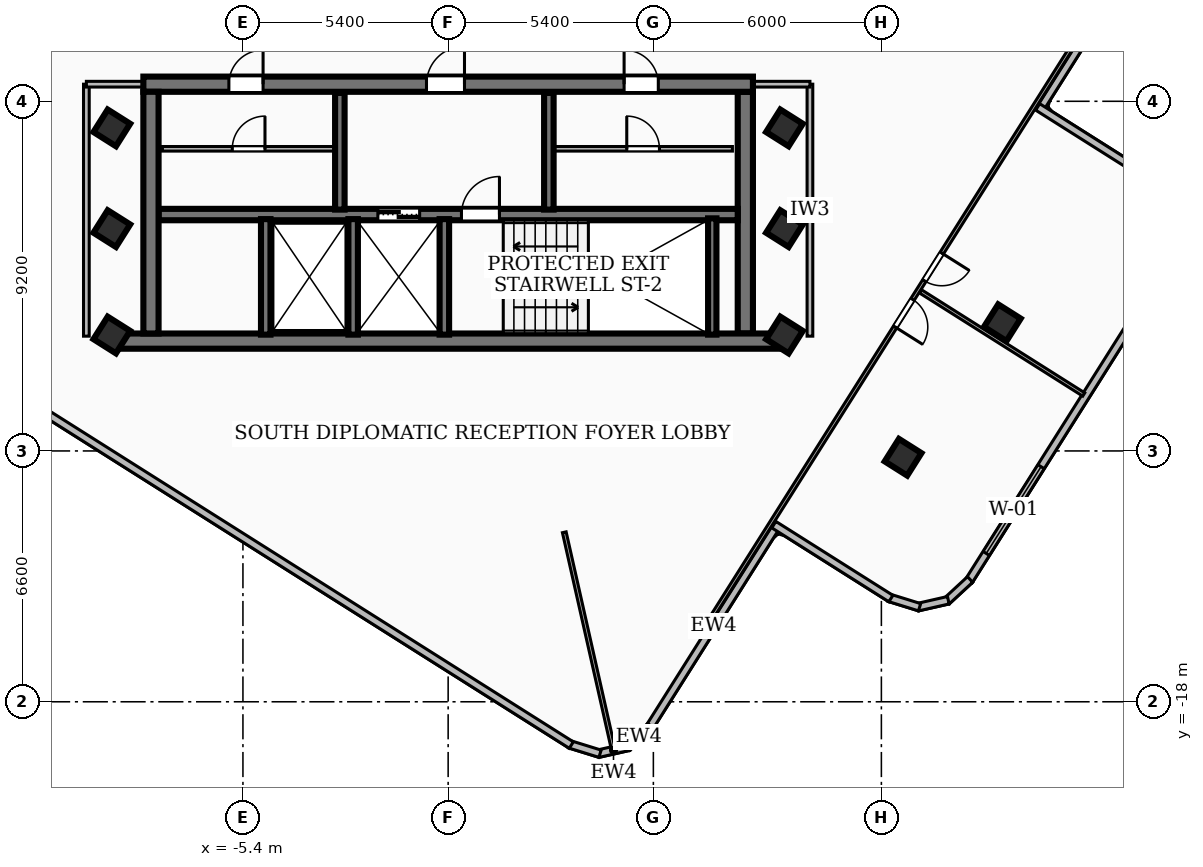
"""IFC4 building model, lengths in metres.
Left out: names, types, materials, properties, quantities, classifications, styles, units other than length and angle.
Written with IfcOpenShell. Run it as: python <this file> out.ifc"""

import sys

from ifc_helpers import new_model, si_unit, direction, frame, frame_2d, origin, origin_2d, place, context, subcontext, project, spatial, rectangle, extrude, element, fill, save


model = new_model("IFC4")
c1 = context("Model", 3, precision=1e-05, world=origin(), true_north=direction((0.0, 1.0)))
c2 = subcontext(c1, "Body", "Model", "MODEL_VIEW")
j1 = project(units=[si_unit("LENGTHUNIT", "METRE"), si_unit("PLANEANGLEUNIT", "RADIAN")], contexts=[c1])
p1 = place(None, origin())
s1 = spatial("IfcSite", under=j1, at=p1, CompositionType="ELEMENT")
p2 = place(p1, origin())
s2 = spatial("IfcBuilding", under=s1, at=p2, CompositionType="ELEMENT")
p3 = place(p2, frame((0.0, 0.0, 274.86)))
s3 = spatial("IfcBuildingStorey", under=s2, at=p3, CompositionType="ELEMENT", Elevation=274.86)
p4 = place(p3, frame((8.78, -8.51, 0.0), z_axis=(0.0, 0.0, 1.0), x_axis=(-1.0, 0.0, 0.0)))
e1 = element("IfcWall", 1, at=p4, inside=s3, PredefinedType="SHEAR", context=c2, shape_type="SweptSolid", body=[
    extrude(rectangle(XDim=17.56, YDim=0.4, at=frame_2d((8.78, 0.0))), origin(), (0.0, 0.0, 1.0), 3.16),
])
p5 = place(p3, frame((-8.02, -1.75, 0.0), z_axis=(0.0, 0.0, 1.0), x_axis=(1.0, 0.0, 0.0)))
e2 = element("IfcWall", 2, at=p5, inside=s3, PredefinedType="SHEAR", context=c2, shape_type="SweptSolid", body=[
    extrude(rectangle(XDim=16.04, YDim=0.4, at=frame_2d((8.02, 0.0))), origin(), (0.0, 0.0, 1.0), 3.16),
])
p6 = place(p5, frame((7.45, 0.0, 0.0)))
e3 = element("IfcOpeningElement", 3, at=p6, cuts=e2, PredefinedType="OPENING", context=c2, shape_type="SweptSolid", body=[
    extrude(rectangle(XDim=1.0, YDim=2.1, at=frame_2d((0.5, 1.05))), frame((0.0, 0.21, 0.0), z_axis=(0.0, -1.0, 0.0), x_axis=(1.0, 0.0, 0.0)), (0.0, 0.0, 1.0), 0.42),
])
p7 = place(p5, frame((12.65, 0.0, 0.0)))
e4 = element("IfcOpeningElement", 4, at=p7, cuts=e2, PredefinedType="OPENING", context=c2, shape_type="SweptSolid", body=[
    extrude(rectangle(XDim=0.9, YDim=2.06, at=frame_2d((0.45, 1.03))), frame((0.0, 0.21, 0.0), z_axis=(0.0, -1.0, 0.0), x_axis=(1.0, 0.0, 0.0)), (0.0, 0.0, 1.0), 0.42),
])
p8 = place(p5, frame((2.25, 0.0, 0.0)))
e5 = element("IfcOpeningElement", 5, at=p8, cuts=e2, PredefinedType="OPENING", context=c2, shape_type="SweptSolid", body=[
    extrude(rectangle(XDim=0.9, YDim=2.06, at=frame_2d((0.45, 1.03))), frame((0.0, 0.21, 0.0), z_axis=(0.0, -1.0, 0.0), x_axis=(1.0, 0.0, 0.0)), (0.0, 0.0, 1.0), 0.42),
])
for number, where, z_axis, x_axis in (
    (6, (-7.82, -8.31, 0.0), (0.0, 0.0, 1.0), (0.0, 1.0, 0.0)),
    (7, (7.82, -1.95, 0.0), (0.0, 0.0, 1.0), (0.0, -1.0, 0.0)),
):
    element("IfcWall", number, at=place(p3, frame(where, z_axis=z_axis, x_axis=x_axis)), inside=s3, PredefinedType="SHEAR", context=c2, shape_type="SweptSolid", body=[
        extrude(rectangle(XDim=6.36, YDim=0.4, at=frame_2d((3.18, 0.0))), origin(), (0.0, 0.0, 1.0), 3.16),
    ])
p9 = place(p3, frame((-7.62, -5.18, 0.0), z_axis=(0.0, 0.0, 1.0), x_axis=(1.0, 0.0, 0.0)))
e8 = element("IfcWall", 8, at=p9, inside=s3, PredefinedType="SOLIDWALL", context=c2, shape_type="SweptSolid", body=[
    extrude(rectangle(XDim=15.24, YDim=0.3, at=frame_2d((7.62, 0.0))), origin(), (0.0, 0.0, 1.0), 3.16),
])
p10 = place(p9, frame((5.77, 0.0, 0.0)))
e9 = element("IfcOpeningElement", 9, at=p10, cuts=e8, PredefinedType="OPENING", context=c2, shape_type="SweptSolid", body=[
    extrude(rectangle(XDim=1.1, YDim=2.15, at=frame_2d((0.55, 1.075))), frame((0.0, 0.16, 0.0), z_axis=(0.0, -1.0, 0.0), x_axis=(1.0, 0.0, 0.0)), (0.0, 0.0, 1.0), 0.32),
])
p11 = place(p9, frame((7.97, 0.0, 0.0)))
e10 = element("IfcOpeningElement", 10, at=p11, cuts=e8, PredefinedType="OPENING", context=c2, shape_type="SweptSolid", body=[
    extrude(rectangle(XDim=1.0, YDim=2.1, at=frame_2d((0.5, 1.05))), frame((0.0, 0.16, 0.0), z_axis=(0.0, -1.0, 0.0), x_axis=(1.0, 0.0, 0.0)), (0.0, 0.0, 1.0), 0.32),
])
p12 = place(p3, frame((6.95, -8.34, 0.0), z_axis=(0.0, 0.0, 1.0), x_axis=(0.0, 1.0, 0.0)))
e11 = element("IfcWall", 11, at=p12, inside=s3, PredefinedType="SOLIDWALL", context=c2, shape_type="SweptSolid", body=[
    extrude(rectangle(XDim=3.06, YDim=0.22, at=frame_2d((1.53, 0.0))), origin(), (0.0, 0.0, 1.0), 3.16),
])
for number, where, z_axis, x_axis in (
    (12, (-0.1, -8.34, 0.0), (0.0, 0.0, 1.0), (0.0, 1.0, 0.0)),
    (13, (-2.5, -8.34, 0.0), (0.0, 0.0, 1.0), (0.0, 1.0, 0.0)),
    (14, (-4.8, -8.34, 0.0), (0.0, 0.0, 1.0), (0.0, 1.0, 0.0)),
):
    element("IfcWall", number, at=place(p3, frame(where, z_axis=z_axis, x_axis=x_axis)), inside=s3, PredefinedType="SOLIDWALL", context=c2, shape_type="SweptSolid", body=[
        extrude(rectangle(XDim=3.04, YDim=0.25, at=frame_2d((1.52, 0.0))), origin(), (0.0, 0.0, 1.0), 3.16),
    ])
for number, where, z_axis, x_axis in (
    (15, (-2.85, -5.05, 0.0), (0.0, 0.0, 1.0), (0.0, 1.0, 0.0)),
    (16, (2.65, -5.05, 0.0), (0.0, 0.0, 1.0), (0.0, 1.0, 0.0)),
):
    element("IfcWall", number, at=place(p3, frame(where, z_axis=z_axis, x_axis=x_axis)), inside=s3, PredefinedType="SOLIDWALL", context=c2, shape_type="SweptSolid", body=[
        extrude(rectangle(XDim=3.07, YDim=0.25, at=frame_2d((1.535, 0.0))), origin(), (0.0, 0.0, 1.0), 3.16),
    ])
for number, where, z_axis, x_axis in (
    (17, (-8.85, -5.55, 0.0), (0.0, 0.0, 1.0), (0.534, 0.845, 0.0)),
    (18, (-8.85, -2.9, 0.0), (0.0, 0.0, 1.0), (0.534, 0.845, 0.0)),
    (19, (8.85, -5.55, 0.0), (0.0, 0.0, 1.0), (0.534, 0.845, 0.0)),
    (20, (8.85, -2.9, 0.0), (0.0, 0.0, 1.0), (0.534, 0.845, 0.0)),
    (21, (8.85, -8.35, 0.0), (0.0, 0.0, 1.0), (0.534, 0.845, 0.0)),
    (22, (-8.85, -8.35, 0.0), (0.0, 0.0, 1.0), (0.534, 0.845, 0.0)),
    (23, (11.971, -11.566, 0.0), (0.0, 0.0, 1.0), (0.534, 0.845, 0.0)),
    (24, (14.583, -8.026, 0.0), (0.0, 0.0, 1.0), (0.534, 0.845, 0.0)),
):
    element("IfcColumn", number, at=place(p3, frame(where, z_axis=z_axis, x_axis=x_axis)), inside=s3, PredefinedType="COLUMN", context=c2, shape_type="SweptSolid", body=[
        extrude(rectangle(XDim=0.7, YDim=0.7, at=origin_2d()), origin(), (0.0, 0.0, 1.0), 3.42),
    ])
p13 = place(p3, frame((8.681, -13.314, 0.0), z_axis=(0.0, 0.0, 1.0), x_axis=(-0.533927810135, -0.845530066623, 0.0)))
e25 = element("IfcWall", 25, at=p13, inside=s3, PredefinedType="SOLIDWALL", context=c2, shape_type="SweptSolid", body=[
    extrude(rectangle(XDim=6.342, YDim=0.2, at=frame_2d((3.171, 0.0))), origin(), (0.0, 0.0, 1.0), 3.16),
])
p14 = place(p3, frame((5.326, -18.638, 0.0), z_axis=(0.0, 0.0, 1.0), x_axis=(-0.734546260064, -0.678558613405, 0.0)))
e26 = element("IfcWall", 26, at=p14, inside=s3, PredefinedType="SOLIDWALL", context=c2, shape_type="SweptSolid", body=[
    extrude(rectangle(XDim=0.837, YDim=0.2, at=frame_2d((0.418, 0.0))), origin(), (0.0, 0.0, 1.0), 3.16),
])
p15 = place(p3, frame((4.753, -19.183, 0.0), z_axis=(0.0, 0.0, 1.0), x_axis=(-0.975095027757, -0.22178748126, 0.0)))
e27 = element("IfcWall", 27, at=p15, inside=s3, PredefinedType="SOLIDWALL", context=c2, shape_type="SweptSolid", body=[
    extrude(rectangle(XDim=0.824, YDim=0.2, at=frame_2d((0.412, 0.0))), origin(), (0.0, 0.0, 1.0), 3.16),
])
p16 = place(p3, frame((3.997, -19.367, 0.0), z_axis=(0.0, 0.0, 1.0), x_axis=(-0.955248680357, 0.295803919306, 0.0)))
e28 = element("IfcWall", 28, at=p16, inside=s3, PredefinedType="SOLIDWALL", context=c2, shape_type="SweptSolid", body=[
    extrude(rectangle(XDim=0.839, YDim=0.2, at=frame_2d((0.419, 0.0))), origin(), (0.0, 0.0, 1.0), 3.16),
])
p17 = place(p3, frame((3.241, -19.139, 0.0), z_axis=(0.0, 0.0, 1.0), x_axis=(-0.84545958519, 0.534039408481, 0.0)))
e29 = element("IfcWall", 29, at=p17, inside=s3, PredefinedType="SOLIDWALL", context=c2, shape_type="SweptSolid", body=[
    extrude(rectangle(XDim=25.923, YDim=0.2, at=frame_2d((12.961, 0.0))), origin(), (0.0, 0.0, 1.0), 3.16),
])
p18 = place(p17, frame((19.02, 0.0, 0.85)))
e30 = element("IfcOpeningElement", 30, at=p18, cuts=e29, PredefinedType="OPENING", context=c2, shape_type="SweptSolid", body=[
    extrude(rectangle(XDim=2.4, YDim=1.65, at=frame_2d((1.2, 0.825))), frame((0.0, 0.11, 0.0), z_axis=(0.0, -1.0, 0.0), x_axis=(1.0, 0.0, 0.0)), (0.0, 0.0, 1.0), 0.22),
])
p19 = place(p3, frame((19.139, 3.241, 0.0), z_axis=(0.0, 0.0, 1.0), x_axis=(-0.534084270085, -0.845431246435, 0.0)))
e31 = element("IfcWall", 31, at=p19, inside=s3, PredefinedType="SOLIDWALL", context=c2, shape_type="SweptSolid", body=[
    extrude(rectangle(XDim=6.742, YDim=0.2, at=frame_2d((3.371, 0.0))), origin(), (0.0, 0.0, 1.0), 3.16),
])
p20 = place(p3, frame((15.513, -2.348, 0.0), z_axis=(0.0, 0.0, 1.0), x_axis=(0.8454427056, -0.534066130313, 0.0)))
e32 = element("IfcWall", 32, at=p20, inside=s3, PredefinedType="SOLIDWALL", context=c2, shape_type="SweptSolid", body=[
    extrude(rectangle(XDim=3.642, YDim=0.2, at=frame_2d((1.821, 0.0))), origin(), (0.0, 0.0, 1.0), 3.16),
])
p21 = place(p3, frame((19.056, -6.346, 0.0), z_axis=(0.0, 0.0, 1.0), x_axis=(-0.534060804588, -0.845446069837, 0.0)))
e33 = element("IfcWall", 33, at=p21, inside=s3, PredefinedType="SOLIDWALL", context=c2, shape_type="SweptSolid", body=[
    extrude(rectangle(XDim=10.023, YDim=0.2, at=frame_2d((5.012, 0.0))), origin(), (0.0, 0.0, 1.0), 3.16),
])
p22 = place(p21, frame((6.468, 0.0, 0.85)))
e34 = element("IfcOpeningElement", 34, at=p22, cuts=e33, PredefinedType="OPENING", context=c2, shape_type="SweptSolid", body=[
    extrude(rectangle(XDim=2.7, YDim=2.1, at=frame_2d((1.35, 1.05))), frame((0.0, 0.11, 0.0), z_axis=(0.0, -1.0, 0.0), x_axis=(1.0, 0.0, 0.0)), (0.0, 0.0, 1.0), 0.22),
])
p23 = place(p3, frame((13.734, -14.782, 0.0), z_axis=(0.0, 0.0, 1.0), x_axis=(-0.73396507435, -0.679187212508, 0.0)))
e35 = element("IfcWall", 35, at=p23, inside=s3, PredefinedType="SOLIDWALL", context=c2, shape_type="SweptSolid", body=[
    extrude(rectangle(XDim=0.838, YDim=0.2, at=frame_2d((0.419, 0.0))), origin(), (0.0, 0.0, 1.0), 3.16),
])
p24 = place(p3, frame((13.161, -15.328, 0.0), z_axis=(0.0, 0.0, 1.0), x_axis=(-0.975030953114, -0.222068999343, 0.0)))
e36 = element("IfcWall", 36, at=p24, inside=s3, PredefinedType="SOLIDWALL", context=c2, shape_type="SweptSolid", body=[
    extrude(rectangle(XDim=0.824, YDim=0.2, at=frame_2d((0.412, 0.0))), origin(), (0.0, 0.0, 1.0), 3.16),
])
p25 = place(p3, frame((12.405, -15.512, 0.0), z_axis=(0.0, 0.0, 1.0), x_axis=(-0.95514660916, 0.296133339917, 0.0)))
e37 = element("IfcWall", 37, at=p25, inside=s3, PredefinedType="SOLIDWALL", context=c2, shape_type="SweptSolid", body=[
    extrude(rectangle(XDim=0.838, YDim=0.2, at=frame_2d((0.419, 0.0))), origin(), (0.0, 0.0, 1.0), 3.16),
])
p26 = place(p3, frame((11.65, -15.284, 0.0), z_axis=(0.0, 0.0, 1.0), x_axis=(-0.84553031048, 0.533927423962, 0.0)))
e38 = element("IfcWall", 38, at=p26, inside=s3, PredefinedType="SOLIDWALL", context=c2, shape_type="SweptSolid", body=[
    extrude(rectangle(XDim=3.643, YDim=0.2, at=frame_2d((1.821, 0.0))), origin(), (0.0, 0.0, 1.0), 3.16),
])
p27 = place(p3, frame((2.8, -3.45, 0.0), z_axis=(0.0, 0.0, 1.0), x_axis=(1.0, 0.0, 0.0)))
e39 = element("IfcWall", 39, at=p27, inside=s3, PredefinedType="PARTITIONING", context=c2, shape_type="SweptSolid", body=[
    extrude(rectangle(XDim=4.68, YDim=0.12, at=frame_2d((2.34, 0.0))), origin(), (0.0, 0.0, 1.0), 3.16),
])
p28 = place(p27, frame((1.9, 0.0, 0.0)))
e40 = element("IfcOpeningElement", 40, at=p28, cuts=e39, PredefinedType="OPENING", context=c2, shape_type="SweptSolid", body=[
    extrude(rectangle(XDim=0.86, YDim=2.04, at=frame_2d((0.43, 1.02))), frame((0.0, 0.07, 0.0), z_axis=(0.0, -1.0, 0.0), x_axis=(1.0, 0.0, 0.0)), (0.0, 0.0, 1.0), 0.14),
])
p29 = place(p3, frame((-7.52, -3.45, 0.0), z_axis=(0.0, 0.0, 1.0), x_axis=(1.0, 0.0, 0.0)))
e41 = element("IfcWall", 41, at=p29, inside=s3, PredefinedType="PARTITIONING", context=c2, shape_type="SweptSolid", body=[
    extrude(rectangle(XDim=4.54, YDim=0.12, at=frame_2d((2.27, 0.0))), origin(), (0.0, 0.0, 1.0), 3.16),
])
p30 = place(p29, frame((1.84, 0.0, 0.0)))
e42 = element("IfcOpeningElement", 42, at=p30, cuts=e41, PredefinedType="OPENING", context=c2, shape_type="SweptSolid", body=[
    extrude(rectangle(XDim=0.86, YDim=2.04, at=frame_2d((0.43, 1.02))), frame((0.0, 0.07, 0.0), z_axis=(0.0, -1.0, 0.0), x_axis=(1.0, 0.0, 0.0)), (0.0, 0.0, 1.0), 0.14),
])
p31 = place(p3, frame((-9.52, -8.38, 0.0), z_axis=(0.0, 0.0, 1.0), x_axis=(0.0, 1.0, 0.0)))
e43 = element("IfcWall", 43, at=p31, inside=s3, PredefinedType="PARTITIONING", context=c2, shape_type="SweptSolid", body=[
    extrude(rectangle(XDim=6.63, YDim=0.15, at=frame_2d((3.315, 0.0))), origin(), (0.0, 0.0, 1.0), 3.16),
])
p32 = place(p3, frame((-7.85, -1.75, 0.0), z_axis=(0.0, 0.0, 1.0), x_axis=(-1.0, 0.0, 0.0)))
e44 = element("IfcWall", 44, at=p32, inside=s3, PredefinedType="PARTITIONING", context=c2, shape_type="SweptSolid", body=[
    extrude(rectangle(XDim=1.67, YDim=0.15, at=frame_2d((0.835, 0.0))), origin(), (0.0, 0.0, 1.0), 2.39),
])
p33 = place(p3, frame((9.52, -8.38, 0.0), z_axis=(0.0, 0.0, 1.0), x_axis=(0.0, 1.0, 0.0)))
e45 = element("IfcWall", 45, at=p33, inside=s3, PredefinedType="PARTITIONING", context=c2, shape_type="SweptSolid", body=[
    extrude(rectangle(XDim=6.63, YDim=0.15, at=frame_2d((3.315, 0.0))), origin(), (0.0, 0.0, 1.0), 2.53),
])
p34 = place(p3, frame((7.85, -1.75, 0.0), z_axis=(0.0, 0.0, 1.0), x_axis=(1.0, 0.0, 0.0)))
e46 = element("IfcWall", 46, at=p34, inside=s3, PredefinedType="PARTITIONING", context=c2, shape_type="SweptSolid", body=[
    extrude(rectangle(XDim=1.67, YDim=0.15, at=frame_2d((0.835, 0.0))), origin(), (0.0, 0.0, 1.0), 2.39),
])
p35 = place(p3, frame((3.056, -13.54, 0.0), z_axis=(0.0, 0.0, 1.0), x_axis=(0.22033949405, -0.975423245244, 0.0)))
e47 = element("IfcWall", 47, at=p35, inside=s3, PredefinedType="PARTITIONING", context=c2, shape_type="SweptSolid", body=[
    extrude(rectangle(XDim=5.814, YDim=0.1, at=frame_2d((2.907, 0.0))), origin(), (0.0, 0.0, 1.0), 3.16),
])
p36 = place(p3, frame((-17.646, -1.178, 0.0), z_axis=(0.0, 0.0, 1.0), x_axis=(0.534052309352, 0.845451436143, 0.0)))
e48 = element("IfcWall", 48, at=p36, inside=s3, PredefinedType="PARTITIONING", context=c2, shape_type="SweptSolid", body=[
    extrude(rectangle(XDim=20.44, YDim=0.1, at=frame_2d((10.22, 0.0))), origin(), (0.0, 0.0, 1.0), 2.53),
])
p37 = place(p36, frame((11.259, 0.0, 0.0)))
e49 = element("IfcOpeningElement", 49, at=p37, cuts=e48, PredefinedType="OPENING", context=c2, shape_type="SweptSolid", body=[
    extrude(rectangle(XDim=0.86, YDim=2.04, at=frame_2d((0.43, 1.02))), frame((0.0, 0.06, 0.0), z_axis=(0.0, -1.0, 0.0), x_axis=(1.0, 0.0, 0.0)), (0.0, 0.0, 1.0), 0.12),
])
p38 = place(p36, frame((9.819, 0.0, 0.0)))
e50 = element("IfcOpeningElement", 50, at=p38, cuts=e48, PredefinedType="OPENING", context=c2, shape_type="SweptSolid", body=[
    extrude(rectangle(XDim=0.86, YDim=2.04, at=frame_2d((0.43, 1.02))), frame((0.0, 0.06, 0.0), z_axis=(0.0, -1.0, 0.0), x_axis=(1.0, 0.0, 0.0)), (0.0, 0.0, 1.0), 0.12),
])
p39 = place(p3, frame((12.426, -7.199, 0.0), z_axis=(0.0, 0.0, 1.0), x_axis=(0.845412458252, -0.53411400977, 0.0)))
e51 = element("IfcWall", 51, at=p39, inside=s3, PredefinedType="PARTITIONING", context=c2, shape_type="SweptSolid", body=[
    extrude(rectangle(XDim=5.085, YDim=0.1, at=frame_2d((2.542, 0.0))), origin(), (0.0, 0.0, 1.0), 2.53),
])
p40 = place(p3, frame((17.646, 1.178, 0.0), z_axis=(0.0, 0.0, 1.0), x_axis=(-0.534052309352, -0.845451436143, 0.0)))
e52 = element("IfcWall", 52, at=p40, inside=s3, PredefinedType="PARTITIONING", context=c2, shape_type="SweptSolid", body=[
    extrude(rectangle(XDim=20.44, YDim=0.1, at=frame_2d((10.22, 0.0))), origin(), (0.0, 0.0, 1.0), 2.53),
])
p41 = place(p40, frame((10.159, 0.0, 0.0)))
e53 = element("IfcOpeningElement", 53, at=p41, cuts=e52, PredefinedType="OPENING", context=c2, shape_type="SweptSolid", body=[
    extrude(rectangle(XDim=0.86, YDim=2.04, at=frame_2d((0.43, 1.02))), frame((0.0, 0.06, 0.0), z_axis=(0.0, -1.0, 0.0), x_axis=(1.0, 0.0, 0.0)), (0.0, 0.0, 1.0), 0.12),
])
p42 = place(p40, frame((8.719, 0.0, 0.0)))
e54 = element("IfcOpeningElement", 54, at=p42, cuts=e52, PredefinedType="OPENING", context=c2, shape_type="SweptSolid", body=[
    extrude(rectangle(XDim=0.86, YDim=2.04, at=frame_2d((0.43, 1.02))), frame((0.0, 0.06, 0.0), z_axis=(0.0, -1.0, 0.0), x_axis=(1.0, 0.0, 0.0)), (0.0, 0.0, 1.0), 0.12),
])
p43 = place(p22, origin())
e55 = element("IfcWindow", 55, at=p43, inside=s3, PartitioningType="SINGLE_PANEL", PredefinedType="WINDOW", context=c2, shape_type="SweptSolid", body=[
    extrude(rectangle(XDim=2.7, YDim=2.1, at=frame_2d((1.35, 1.05))), frame((0.0, 0.03, 0.0), z_axis=(0.0, -1.0, 0.0), x_axis=(1.0, 0.0, 0.0)), (0.0, 0.0, 1.0), 0.06),
])
fill(e34, e55)
p44 = place(p6, origin())
e56 = element("IfcDoor", 56, at=p44, inside=s3, OperationType="SINGLE_SWING_RIGHT", PredefinedType="DOOR", context=c2, shape_type="SweptSolid", body=[
    extrude(rectangle(XDim=1.0, YDim=2.1, at=frame_2d((0.5, 1.05))), frame((0.0, 0.025, 0.0), z_axis=(0.0, -1.0, 0.0), x_axis=(1.0, 0.0, 0.0)), (0.0, 0.0, 1.0), 0.05),
])
fill(e3, e56)
p45 = place(p10, origin())
e57 = element("IfcDoor", 57, at=p45, inside=s3, OperationType="DOUBLE_DOOR_SLIDING", PredefinedType="DOOR", context=c2, shape_type="SweptSolid", body=[
    extrude(rectangle(XDim=1.1, YDim=2.15, at=frame_2d((0.55, 1.075))), frame((0.0, 0.025, 0.0), z_axis=(0.0, -1.0, 0.0), x_axis=(1.0, 0.0, 0.0)), (0.0, 0.0, 1.0), 0.05),
])
fill(e9, e57)
p46 = place(p11, origin())
e58 = element("IfcDoor", 58, at=p46, inside=s3, OperationType="SINGLE_SWING_RIGHT", PredefinedType="DOOR", context=c2, shape_type="SweptSolid", body=[
    extrude(rectangle(XDim=1.0, YDim=2.1, at=frame_2d((0.5, 1.05))), frame((0.0, 0.025, 0.0), z_axis=(0.0, -1.0, 0.0), x_axis=(1.0, 0.0, 0.0)), (0.0, 0.0, 1.0), 0.05),
])
fill(e10, e58)
p47 = place(p7, origin())
e59 = element("IfcDoor", 59, at=p47, inside=s3, OperationType="SINGLE_SWING_LEFT", PredefinedType="DOOR", context=c2, shape_type="SweptSolid", body=[
    extrude(rectangle(XDim=0.9, YDim=2.06, at=frame_2d((0.45, 1.03))), frame((0.0, 0.025, 0.0), z_axis=(0.0, -1.0, 0.0), x_axis=(1.0, 0.0, 0.0)), (0.0, 0.0, 1.0), 0.05),
])
fill(e4, e59)
p48 = place(p8, origin())
e60 = element("IfcDoor", 60, at=p48, inside=s3, OperationType="SINGLE_SWING_RIGHT", PredefinedType="DOOR", context=c2, shape_type="SweptSolid", body=[
    extrude(rectangle(XDim=0.9, YDim=2.06, at=frame_2d((0.45, 1.03))), frame((0.0, 0.025, 0.0), z_axis=(0.0, -1.0, 0.0), x_axis=(1.0, 0.0, 0.0)), (0.0, 0.0, 1.0), 0.05),
])
fill(e5, e60)
p49 = place(p28, origin())
e61 = element("IfcDoor", 61, at=p49, inside=s3, OperationType="SINGLE_SWING_LEFT", PredefinedType="DOOR", context=c2, shape_type="SweptSolid", body=[
    extrude(rectangle(XDim=0.86, YDim=2.04, at=frame_2d((0.43, 1.02))), frame((0.0, 0.025, 0.0), z_axis=(0.0, -1.0, 0.0), x_axis=(1.0, 0.0, 0.0)), (0.0, 0.0, 1.0), 0.05),
])
fill(e40, e61)
p50 = place(p30, origin())
e62 = element("IfcDoor", 62, at=p50, inside=s3, OperationType="SINGLE_SWING_RIGHT", PredefinedType="DOOR", context=c2, shape_type="SweptSolid", body=[
    extrude(rectangle(XDim=0.86, YDim=2.04, at=frame_2d((0.43, 1.02))), frame((0.0, 0.025, 0.0), z_axis=(0.0, -1.0, 0.0), x_axis=(1.0, 0.0, 0.0)), (0.0, 0.0, 1.0), 0.05),
])
fill(e42, e62)
p51 = place(p41, origin())
e63 = element("IfcDoor", 63, at=p51, inside=s3, OperationType="SINGLE_SWING_RIGHT", PredefinedType="DOOR", context=c2, shape_type="SweptSolid", body=[
    extrude(rectangle(XDim=0.86, YDim=2.04, at=frame_2d((0.43, 1.02))), frame((0.0, 0.025, 0.0), z_axis=(0.0, -1.0, 0.0), x_axis=(1.0, 0.0, 0.0)), (0.0, 0.0, 1.0), 0.05),
])
fill(e53, e63)
p52 = place(p42, origin())
e64 = element("IfcDoor", 64, at=p52, inside=s3, OperationType="SINGLE_SWING_LEFT", PredefinedType="DOOR", context=c2, shape_type="SweptSolid", body=[
    extrude(rectangle(XDim=0.86, YDim=2.04, at=frame_2d((0.43, 1.02))), frame((0.0, 0.025, 0.0), z_axis=(0.0, -1.0, 0.0), x_axis=(1.0, 0.0, 0.0)), (0.0, 0.0, 1.0), 0.05),
])
fill(e54, e64)
save(model, sys.argv[1])
